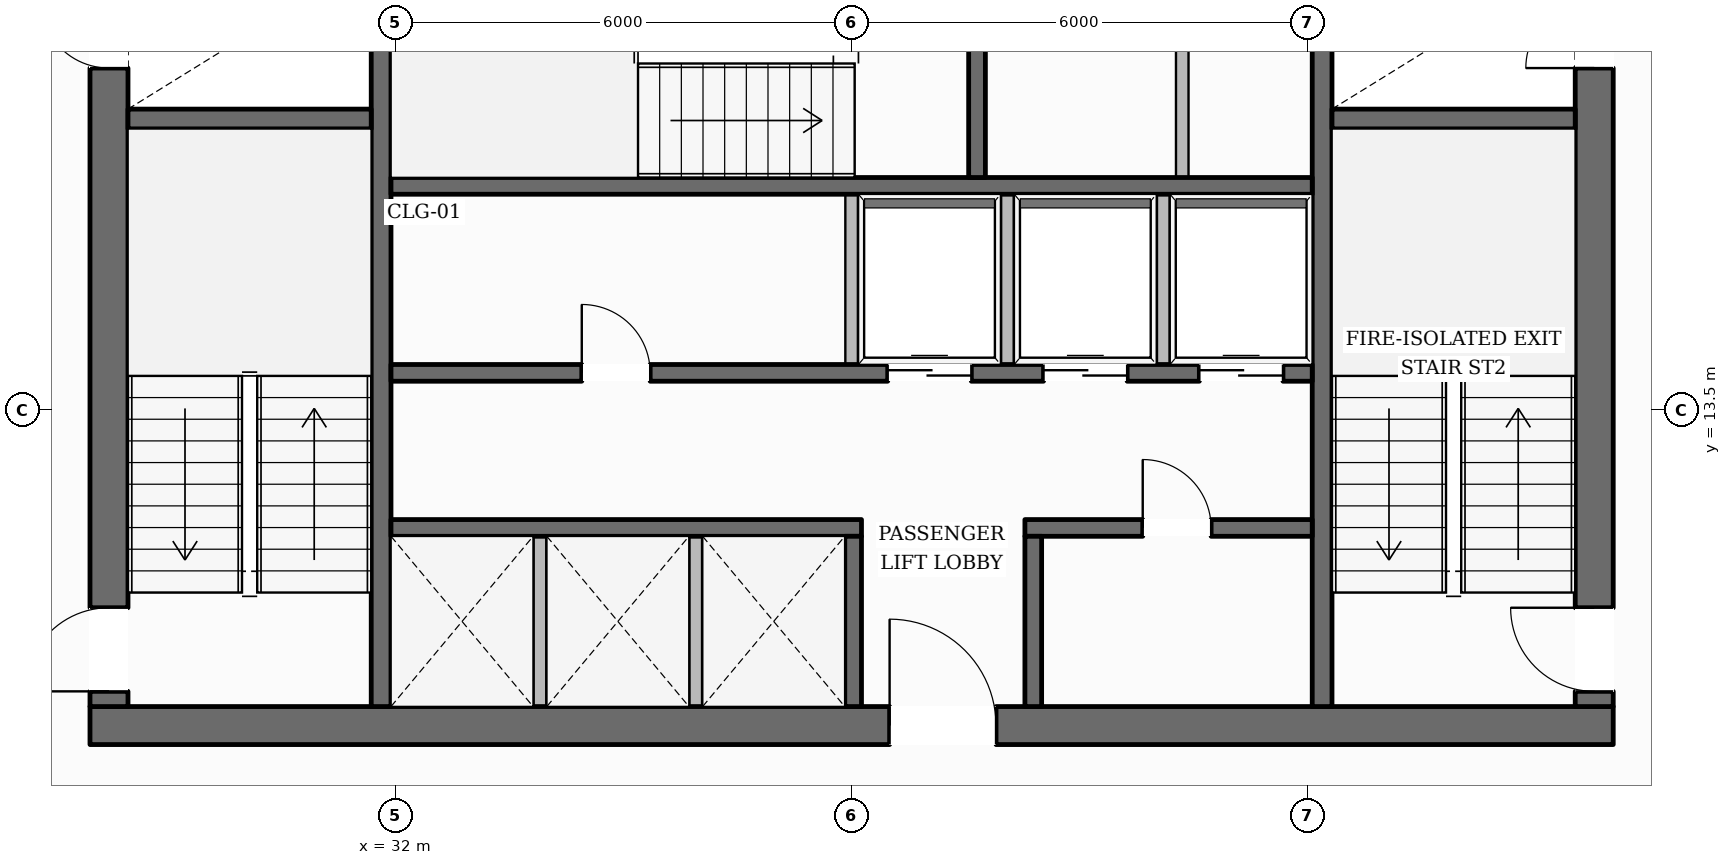
"""IFC4 building model, lengths in metres.
Left out: names, types, materials, properties, quantities, classifications, styles, units other than length and angle.
Written with IfcOpenShell. Run it as: python <this file> out.ifc"""

import sys

from ifc_helpers import new_model, si_unit, direction, frame, frame_2d, origin, place, context, subcontext, project, spatial, rectangle, extrude, element, fill, save


model = new_model("IFC4")
c1 = context("Model", 3, precision=1e-05, world=origin(), true_north=direction((0.0, 1.0)))
c2 = subcontext(c1, "Body", "Model", "MODEL_VIEW")
j1 = project(units=[si_unit("LENGTHUNIT", "METRE"), si_unit("PLANEANGLEUNIT", "RADIAN")], contexts=[c1])
p1 = place(None, origin())
s1 = spatial("IfcSite", under=j1, at=p1, CompositionType="ELEMENT")
p2 = place(p1, origin())
s2 = spatial("IfcBuilding", under=s1, at=p2, CompositionType="ELEMENT")
p3 = place(p2, frame((0.0, 0.0, 135.55)))
s3 = spatial("IfcBuildingStorey", under=s2, at=p3, CompositionType="ELEMENT", Elevation=135.55)
p4 = place(p3, frame((27.98, 9.35, 0.0), z_axis=(0.0, 0.0, 1.0), x_axis=(1.0, 0.0, 0.0)))
e1 = element("IfcWall", 1, at=p4, inside=s3, PredefinedType="SOLIDWALL", context=c2, shape_type="SweptSolid", body=[
    extrude(rectangle(XDim=20.04, YDim=0.5, at=frame_2d((10.02, 0.0))), origin(), (0.0, 0.0, 1.0), 3.6),
])
p5 = place(p4, frame((10.52, 0.0, 0.0)))
e2 = element("IfcOpeningElement", 2, at=p5, cuts=e1, PredefinedType="OPENING", context=c2, shape_type="SweptSolid", body=[
    extrude(rectangle(XDim=1.4, YDim=2.2, at=frame_2d((0.7, 1.1))), frame((0.0, 0.26, 0.0), z_axis=(0.0, -1.0, 0.0), x_axis=(1.0, 0.0, 0.0)), (0.0, 0.0, 1.0), 0.52),
])
p6 = place(p3, frame((28.23, 9.6, 0.0), z_axis=(0.0, 0.0, 1.0), x_axis=(0.0, 1.0, 0.0)))
e3 = element("IfcWall", 3, at=p6, inside=s3, PredefinedType="SOLIDWALL", context=c2, shape_type="SweptSolid", body=[
    extrude(rectangle(XDim=13.0, YDim=0.5, at=frame_2d((6.5, 0.0))), origin(), (0.0, 0.0, 1.0), 3.6),
])
p7 = place(p6, frame((0.2, 0.0, 0.0)))
e4 = element("IfcOpeningElement", 4, at=p7, cuts=e3, PredefinedType="OPENING", context=c2, shape_type="SweptSolid", body=[
    extrude(rectangle(XDim=1.1, YDim=2.15, at=frame_2d((0.55, 1.075))), frame((0.0, 0.26, 0.0), z_axis=(0.0, -1.0, 0.0), x_axis=(1.0, 0.0, 0.0)), (0.0, 0.0, 1.0), 0.52),
])
p8 = place(p6, frame((8.4, 0.0, 0.0)))
e5 = element("IfcOpeningElement", 5, at=p8, cuts=e3, PredefinedType="OPENING", context=c2, shape_type="SweptSolid", body=[
    extrude(rectangle(XDim=0.9, YDim=2.1, at=frame_2d((0.45, 1.05))), frame((0.0, 0.26, 0.0), z_axis=(0.0, -1.0, 0.0), x_axis=(1.0, 0.0, 0.0)), (0.0, 0.0, 1.0), 0.52),
])
p9 = place(p3, frame((47.77, 9.6, 0.0), z_axis=(0.0, 0.0, 1.0), x_axis=(0.0, 1.0, 0.0)))
e6 = element("IfcWall", 6, at=p9, inside=s3, PredefinedType="SOLIDWALL", context=c2, shape_type="SweptSolid", body=[
    extrude(rectangle(XDim=13.0, YDim=0.5, at=frame_2d((6.5, 0.0))), origin(), (0.0, 0.0, 1.0), 3.6),
])
p10 = place(p9, frame((0.2, 0.0, 0.0)))
e7 = element("IfcOpeningElement", 7, at=p10, cuts=e6, PredefinedType="OPENING", context=c2, shape_type="SweptSolid", body=[
    extrude(rectangle(XDim=1.1, YDim=2.15, at=frame_2d((0.55, 1.075))), frame((0.0, 0.26, 0.0), z_axis=(0.0, -1.0, 0.0), x_axis=(1.0, 0.0, 0.0)), (0.0, 0.0, 1.0), 0.52),
])
p11 = place(p9, frame((8.4, 0.0, 0.0)))
e8 = element("IfcOpeningElement", 8, at=p11, cuts=e6, PredefinedType="OPENING", context=c2, shape_type="SweptSolid", body=[
    extrude(rectangle(XDim=0.9, YDim=2.1, at=frame_2d((0.45, 1.05))), frame((0.0, 0.26, 0.0), z_axis=(0.0, -1.0, 0.0), x_axis=(1.0, 0.0, 0.0)), (0.0, 0.0, 1.0), 0.52),
])
p12 = place(p3, frame((31.81, 9.6, 0.0), z_axis=(0.0, 0.0, 1.0), x_axis=(0.0, 1.0, 0.0)))
e9 = element("IfcWall", 9, at=p12, inside=s3, PredefinedType="SHEAR", context=c2, shape_type="SweptSolid", body=[
    extrude(rectangle(XDim=13.0, YDim=0.26, at=frame_2d((6.5, 0.0))), origin(), (0.0, 0.0, 1.0), 3.6),
])
p13 = place(p12, frame((10.925, 0.0, 0.0)))
e10 = element("IfcOpeningElement", 10, at=p13, cuts=e9, PredefinedType="OPENING", context=c2, shape_type="SweptSolid", body=[
    extrude(rectangle(XDim=1.25, YDim=2.25, at=frame_2d((0.625, 1.125))), frame((0.0, 0.14, 0.0), z_axis=(0.0, -1.0, 0.0), x_axis=(1.0, 0.0, 0.0)), (0.0, 0.0, 1.0), 0.28),
])
p14 = place(p3, frame((44.19, 9.6, 0.0), z_axis=(0.0, 0.0, 1.0), x_axis=(0.0, 1.0, 0.0)))
e11 = element("IfcWall", 11, at=p14, inside=s3, PredefinedType="SHEAR", context=c2, shape_type="SweptSolid", body=[
    extrude(rectangle(XDim=13.0, YDim=0.26, at=frame_2d((6.5, 0.0))), origin(), (0.0, 0.0, 1.0), 3.6),
])
p15 = place(p14, frame((10.925, 0.0, 0.0)))
e12 = element("IfcOpeningElement", 12, at=p15, cuts=e11, PredefinedType="OPENING", context=c2, shape_type="SweptSolid", body=[
    extrude(rectangle(XDim=1.25, YDim=2.25, at=frame_2d((0.625, 1.125))), frame((0.0, 0.14, 0.0), z_axis=(0.0, -1.0, 0.0), x_axis=(1.0, 0.0, 0.0)), (0.0, 0.0, 1.0), 0.28),
])
for number, where, z_axis, x_axis in (
    (13, (28.48, 17.33, 0.0), (0.0, 0.0, 1.0), (1.0, 0.0, 0.0)),
    (14, (44.32, 17.33, 0.0), (0.0, 0.0, 1.0), (1.0, 0.0, 0.0)),
):
    element("IfcWall", number, at=place(p3, frame(where, z_axis=z_axis, x_axis=x_axis)), inside=s3, PredefinedType="SHEAR", context=c2, shape_type="SweptSolid", body=[
        extrude(rectangle(XDim=3.2, YDim=0.26, at=frame_2d((1.6, 0.0))), origin(), (0.0, 0.0, 1.0), 3.6),
    ])
p16 = place(p3, frame((31.94, 16.45, 0.0), z_axis=(0.0, 0.0, 1.0), x_axis=(1.0, 0.0, 0.0)))
e15 = element("IfcWall", 15, at=p16, inside=s3, PredefinedType="SOLIDWALL", context=c2, shape_type="SweptSolid", body=[
    extrude(rectangle(XDim=12.12, YDim=0.22, at=frame_2d((6.06, 0.0))), origin(), (0.0, 0.0, 1.0), 3.6),
])
p17 = place(p3, frame((39.65, 16.56, 0.0), z_axis=(0.0, 0.0, 1.0), x_axis=(0.0, 1.0, 0.0)))
e16 = element("IfcWall", 16, at=p17, inside=s3, PredefinedType="SOLIDWALL", context=c2, shape_type="SweptSolid", body=[
    extrude(rectangle(XDim=3.2, YDim=0.22, at=frame_2d((1.6, 0.0))), origin(), (0.0, 0.0, 1.0), 3.6),
])
p18 = place(p3, frame((31.94, 13.99, 0.0), z_axis=(0.0, 0.0, 1.0), x_axis=(1.0, 0.0, 0.0)))
e17 = element("IfcWall", 17, at=p18, inside=s3, PredefinedType="SOLIDWALL", context=c2, shape_type="SweptSolid", body=[
    extrude(rectangle(XDim=12.12, YDim=0.22, at=frame_2d((6.06, 0.0))), origin(), (0.0, 0.0, 1.0), 3.6),
])
p19 = place(p18, frame((2.51, 0.0, 0.0)))
e18 = element("IfcOpeningElement", 18, at=p19, cuts=e17, PredefinedType="OPENING", context=c2, shape_type="SweptSolid", body=[
    extrude(rectangle(XDim=0.9, YDim=2.1, at=frame_2d((0.45, 1.05))), frame((0.0, 0.12, 0.0), z_axis=(0.0, -1.0, 0.0), x_axis=(1.0, 0.0, 0.0)), (0.0, 0.0, 1.0), 0.24),
])
p20 = place(p18, frame((6.535, 0.0, 0.0)))
e19 = element("IfcOpeningElement", 19, at=p20, cuts=e17, PredefinedType="OPENING", context=c2, shape_type="SweptSolid", body=[
    extrude(rectangle(XDim=1.1, YDim=2.2, at=frame_2d((0.55, 1.1))), frame((0.0, 0.12, 0.0), z_axis=(0.0, -1.0, 0.0), x_axis=(1.0, 0.0, 0.0)), (0.0, 0.0, 1.0), 0.24),
])
p21 = place(p18, frame((8.585, 0.0, 0.0)))
e20 = element("IfcOpeningElement", 20, at=p21, cuts=e17, PredefinedType="OPENING", context=c2, shape_type="SweptSolid", body=[
    extrude(rectangle(XDim=1.1, YDim=2.2, at=frame_2d((0.55, 1.1))), frame((0.0, 0.12, 0.0), z_axis=(0.0, -1.0, 0.0), x_axis=(1.0, 0.0, 0.0)), (0.0, 0.0, 1.0), 0.24),
])
p22 = place(p18, frame((10.635, 0.0, 0.0)))
e21 = element("IfcOpeningElement", 21, at=p22, cuts=e17, PredefinedType="OPENING", context=c2, shape_type="SweptSolid", body=[
    extrude(rectangle(XDim=1.1, YDim=2.2, at=frame_2d((0.55, 1.1))), frame((0.0, 0.12, 0.0), z_axis=(0.0, -1.0, 0.0), x_axis=(1.0, 0.0, 0.0)), (0.0, 0.0, 1.0), 0.24),
])
p23 = place(p3, frame((31.94, 11.95, 0.0), z_axis=(0.0, 0.0, 1.0), x_axis=(1.0, 0.0, 0.0)))
e22 = element("IfcWall", 22, at=p23, inside=s3, PredefinedType="SOLIDWALL", context=c2, shape_type="SweptSolid", body=[
    extrude(rectangle(XDim=6.19, YDim=0.22, at=frame_2d((3.095, 0.0))), origin(), (0.0, 0.0, 1.0), 3.6),
])
p24 = place(p3, frame((40.28, 11.95, 0.0), z_axis=(0.0, 0.0, 1.0), x_axis=(1.0, 0.0, 0.0)))
e23 = element("IfcWall", 23, at=p24, inside=s3, PredefinedType="SOLIDWALL", context=c2, shape_type="SweptSolid", body=[
    extrude(rectangle(XDim=3.78, YDim=0.22, at=frame_2d((1.89, 0.0))), origin(), (0.0, 0.0, 1.0), 3.6),
])
p25 = place(p24, frame((1.55, 0.0, 0.0)))
e24 = element("IfcOpeningElement", 24, at=p25, cuts=e23, PredefinedType="OPENING", context=c2, shape_type="SweptSolid", body=[
    extrude(rectangle(XDim=0.9, YDim=2.1, at=frame_2d((0.45, 1.05))), frame((0.0, 0.12, 0.0), z_axis=(0.0, -1.0, 0.0), x_axis=(1.0, 0.0, 0.0)), (0.0, 0.0, 1.0), 0.24),
])
for number, where, z_axis, x_axis in (
    (25, (38.02, 9.6, 0.0), (0.0, 0.0, 1.0), (0.0, 1.0, 0.0)),
    (26, (40.39, 9.6, 0.0), (0.0, 0.0, 1.0), (0.0, 1.0, 0.0)),
):
    element("IfcWall", number, at=place(p3, frame(where, z_axis=z_axis, x_axis=x_axis)), inside=s3, PredefinedType="SOLIDWALL", context=c2, shape_type="SweptSolid", body=[
        extrude(rectangle(XDim=2.24, YDim=0.22, at=frame_2d((1.12, 0.0))), origin(), (0.0, 0.0, 1.0), 3.6),
    ])
p26 = place(p3, frame((13.349, 12.098, 0.0), z_axis=(0.0, 0.0, 1.0), x_axis=(0.506726076083, 0.862107118528, 0.0)))
e27 = element("IfcWall", 27, at=p26, inside=s3, PredefinedType="STANDARD", context=c2, shape_type="SweptSolid", body=[
    extrude(rectangle(XDim=37.522, YDim=0.38, at=frame_2d((18.761, 0.0))), origin(), (0.0, 0.0, 1.0), 3.059),
])
p27 = place(p26, frame((33.226, 0.0, 0.65)))
e28 = element("IfcOpeningElement", 28, at=p27, cuts=e27, PredefinedType="OPENING", context=c2, shape_type="SweptSolid", body=[
    extrude(rectangle(XDim=1.55, YDim=1.75, at=frame_2d((0.775, 0.875))), frame((0.0, 0.2, 0.0), z_axis=(0.0, -1.0, 0.0), x_axis=(1.0, 0.0, 0.0)), (0.0, 0.0, 1.0), 0.4),
])
p28 = place(p26, frame((27.131, 0.0, 0.65)))
e29 = element("IfcOpeningElement", 29, at=p28, cuts=e27, PredefinedType="OPENING", context=c2, shape_type="SweptSolid", body=[
    extrude(rectangle(XDim=1.55, YDim=1.75, at=frame_2d((0.775, 0.875))), frame((0.0, 0.2, 0.0), z_axis=(0.0, -1.0, 0.0), x_axis=(1.0, 0.0, 0.0)), (0.0, 0.0, 1.0), 0.4),
])
p29 = place(p26, frame((21.037, 0.0, 0.65)))
e30 = element("IfcOpeningElement", 30, at=p29, cuts=e27, PredefinedType="OPENING", context=c2, shape_type="SweptSolid", body=[
    extrude(rectangle(XDim=1.55, YDim=1.75, at=frame_2d((0.775, 0.875))), frame((0.0, 0.2, 0.0), z_axis=(0.0, -1.0, 0.0), x_axis=(1.0, 0.0, 0.0)), (0.0, 0.0, 1.0), 0.4),
])
p30 = place(p26, frame((8.848, 0.0, 0.65)))
e31 = element("IfcOpeningElement", 31, at=p30, cuts=e27, PredefinedType="OPENING", context=c2, shape_type="SweptSolid", body=[
    extrude(rectangle(XDim=1.55, YDim=1.75, at=frame_2d((0.775, 0.875))), frame((0.0, 0.2, 0.0), z_axis=(0.0, -1.0, 0.0), x_axis=(1.0, 0.0, 0.0)), (0.0, 0.0, 1.0), 0.4),
])
p31 = place(p26, frame((2.753, 0.0, 0.65)))
e32 = element("IfcOpeningElement", 32, at=p31, cuts=e27, PredefinedType="OPENING", context=c2, shape_type="SweptSolid", body=[
    extrude(rectangle(XDim=1.55, YDim=1.75, at=frame_2d((0.775, 0.875))), frame((0.0, 0.2, 0.0), z_axis=(0.0, -1.0, 0.0), x_axis=(1.0, 0.0, 0.0)), (0.0, 0.0, 1.0), 0.4),
])
p32 = place(p3, frame((43.578, 44.481, 0.0), z_axis=(0.0, 0.0, 1.0), x_axis=(0.504151594759, -0.863615174428, 0.0)))
e33 = element("IfcWall", 33, at=p32, inside=s3, PredefinedType="STANDARD", context=c2, shape_type="SweptSolid", body=[
    extrude(rectangle(XDim=37.328, YDim=0.38, at=frame_2d((18.664, 0.0))), origin(), (0.0, 0.0, 1.0), 3.059),
])
p33 = place(p32, frame((8.932, 0.0, 0.0)))
e34 = element("IfcOpeningElement", 34, at=p33, cuts=e33, PredefinedType="OPENING", context=c2, shape_type="SweptSolid", body=[
    extrude(rectangle(XDim=1.0, YDim=2.2, at=frame_2d((0.5, 1.1))), frame((0.0, 0.2, 0.0), z_axis=(0.0, -1.0, 0.0), x_axis=(1.0, 0.0, 0.0)), (0.0, 0.0, 1.0), 0.4),
])
p34 = place(p32, frame((33.041, 0.0, 0.65)))
e35 = element("IfcOpeningElement", 35, at=p34, cuts=e33, PredefinedType="OPENING", context=c2, shape_type="SweptSolid", body=[
    extrude(rectangle(XDim=1.55, YDim=1.75, at=frame_2d((0.775, 0.875))), frame((0.0, 0.2, 0.0), z_axis=(0.0, -1.0, 0.0), x_axis=(1.0, 0.0, 0.0)), (0.0, 0.0, 1.0), 0.4),
])
p35 = place(p32, frame((26.979, 0.0, 0.65)))
e36 = element("IfcOpeningElement", 36, at=p35, cuts=e33, PredefinedType="OPENING", context=c2, shape_type="SweptSolid", body=[
    extrude(rectangle(XDim=1.55, YDim=1.75, at=frame_2d((0.775, 0.875))), frame((0.0, 0.2, 0.0), z_axis=(0.0, -1.0, 0.0), x_axis=(1.0, 0.0, 0.0)), (0.0, 0.0, 1.0), 0.4),
])
p36 = place(p32, frame((20.917, 0.0, 0.65)))
e37 = element("IfcOpeningElement", 37, at=p36, cuts=e33, PredefinedType="OPENING", context=c2, shape_type="SweptSolid", body=[
    extrude(rectangle(XDim=1.55, YDim=1.75, at=frame_2d((0.775, 0.875))), frame((0.0, 0.2, 0.0), z_axis=(0.0, -1.0, 0.0), x_axis=(1.0, 0.0, 0.0)), (0.0, 0.0, 1.0), 0.4),
])
p37 = place(p32, frame((2.732, 0.0, 0.65)))
e38 = element("IfcOpeningElement", 38, at=p37, cuts=e33, PredefinedType="OPENING", context=c2, shape_type="SweptSolid", body=[
    extrude(rectangle(XDim=1.55, YDim=1.75, at=frame_2d((0.775, 0.875))), frame((0.0, 0.2, 0.0), z_axis=(0.0, -1.0, 0.0), x_axis=(1.0, 0.0, 0.0)), (0.0, 0.0, 1.0), 0.4),
])
for number, where, z_axis, x_axis in (
    (39, (33.9, 9.55, 0.0), (0.0, 0.0, 1.0), (0.0, 1.0, 0.0)),
    (40, (35.95, 9.55, 0.0), (0.0, 0.0, 1.0), (0.0, 1.0, 0.0)),
):
    element("IfcWall", number, at=place(p3, frame(where, z_axis=z_axis, x_axis=x_axis)), inside=s3, PredefinedType="PARTITIONING", context=c2, shape_type="SweptSolid", body=[
        extrude(rectangle(XDim=2.29, YDim=0.165, at=frame_2d((1.145, 0.0))), origin(), (0.0, 0.0, 1.0), 3.6),
    ])
for number, where, z_axis, x_axis in (
    (41, (38.0, 14.1, 0.0), (0.0, 0.0, 1.0), (0.0, 1.0, 0.0)),
    (42, (40.05, 14.1, 0.0), (0.0, 0.0, 1.0), (0.0, 1.0, 0.0)),
    (43, (42.1, 14.1, 0.0), (0.0, 0.0, 1.0), (0.0, 1.0, 0.0)),
):
    element("IfcWall", number, at=place(p3, frame(where, z_axis=z_axis, x_axis=x_axis)), inside=s3, PredefinedType="PARTITIONING", context=c2, shape_type="SweptSolid", body=[
        extrude(rectangle(XDim=2.24, YDim=0.165, at=frame_2d((1.12, 0.0))), origin(), (0.0, 0.0, 1.0), 3.6),
    ])
p38 = place(p3, frame((42.35, 16.56, 0.0), z_axis=(0.0, 0.0, 1.0), x_axis=(0.0, 1.0, 0.0)))
e44 = element("IfcWall", 44, at=p38, inside=s3, PredefinedType="PARTITIONING", context=c2, shape_type="SweptSolid", body=[
    extrude(rectangle(XDim=3.2, YDim=0.165, at=frame_2d((1.6, 0.0))), origin(), (0.0, 0.0, 1.0), 3.6),
])
p39 = place(p7, origin())
e45 = element("IfcDoor", 45, at=p39, inside=s3, OperationType="SINGLE_SWING_LEFT", PredefinedType="DOOR", context=c2, shape_type="SweptSolid", body=[
    extrude(rectangle(XDim=1.1, YDim=2.15, at=frame_2d((0.55, 1.075))), frame((0.0, 0.025, 0.0), z_axis=(0.0, -1.0, 0.0), x_axis=(1.0, 0.0, 0.0)), (0.0, 0.0, 1.0), 0.05),
])
fill(e4, e45)
p40 = place(p10, origin())
e46 = element("IfcDoor", 46, at=p40, inside=s3, OperationType="SINGLE_SWING_RIGHT", PredefinedType="DOOR", context=c2, shape_type="SweptSolid", body=[
    extrude(rectangle(XDim=1.1, YDim=2.15, at=frame_2d((0.55, 1.075))), frame((0.0, 0.025, 0.0), z_axis=(0.0, -1.0, 0.0), x_axis=(1.0, 0.0, 0.0)), (0.0, 0.0, 1.0), 0.05),
])
fill(e7, e46)
p41 = place(p8, origin())
e47 = element("IfcDoor", 47, at=p41, inside=s3, OperationType="SINGLE_SWING_RIGHT", PredefinedType="DOOR", context=c2, shape_type="SweptSolid", body=[
    extrude(rectangle(XDim=0.9, YDim=2.1, at=frame_2d((0.45, 1.05))), frame((0.0, 0.025, 0.0), z_axis=(0.0, -1.0, 0.0), x_axis=(1.0, 0.0, 0.0)), (0.0, 0.0, 1.0), 0.05),
])
fill(e5, e47)
p42 = place(p11, origin())
e48 = element("IfcDoor", 48, at=p42, inside=s3, OperationType="SINGLE_SWING_LEFT", PredefinedType="DOOR", context=c2, shape_type="SweptSolid", body=[
    extrude(rectangle(XDim=0.9, YDim=2.1, at=frame_2d((0.45, 1.05))), frame((0.0, 0.025, 0.0), z_axis=(0.0, -1.0, 0.0), x_axis=(1.0, 0.0, 0.0)), (0.0, 0.0, 1.0), 0.05),
])
fill(e8, e48)
p43 = place(p5, origin())
e49 = element("IfcDoor", 49, at=p43, inside=s3, OperationType="SINGLE_SWING_LEFT", PredefinedType="DOOR", context=c2, shape_type="SweptSolid", body=[
    extrude(rectangle(XDim=1.4, YDim=2.2, at=frame_2d((0.7, 1.1))), frame((0.0, 0.025, 0.0), z_axis=(0.0, -1.0, 0.0), x_axis=(1.0, 0.0, 0.0)), (0.0, 0.0, 1.0), 0.05),
])
fill(e2, e49)
p44 = place(p19, origin())
e50 = element("IfcDoor", 50, at=p44, inside=s3, OperationType="SINGLE_SWING_LEFT", PredefinedType="DOOR", context=c2, shape_type="SweptSolid", body=[
    extrude(rectangle(XDim=0.9, YDim=2.1, at=frame_2d((0.45, 1.05))), frame((0.0, 0.025, 0.0), z_axis=(0.0, -1.0, 0.0), x_axis=(1.0, 0.0, 0.0)), (0.0, 0.0, 1.0), 0.05),
])
fill(e18, e50)
p45 = place(p20, origin())
e51 = element("IfcDoor", 51, at=p45, inside=s3, OperationType="DOUBLE_DOOR_SLIDING", PredefinedType="DOOR", context=c2, shape_type="SweptSolid", body=[
    extrude(rectangle(XDim=1.1, YDim=2.2, at=frame_2d((0.55, 1.1))), frame((0.0, 0.025, 0.0), z_axis=(0.0, -1.0, 0.0), x_axis=(1.0, 0.0, 0.0)), (0.0, 0.0, 1.0), 0.05),
])
fill(e19, e51)
p46 = place(p21, origin())
e52 = element("IfcDoor", 52, at=p46, inside=s3, OperationType="DOUBLE_DOOR_SLIDING", PredefinedType="DOOR", context=c2, shape_type="SweptSolid", body=[
    extrude(rectangle(XDim=1.1, YDim=2.2, at=frame_2d((0.55, 1.1))), frame((0.0, 0.025, 0.0), z_axis=(0.0, -1.0, 0.0), x_axis=(1.0, 0.0, 0.0)), (0.0, 0.0, 1.0), 0.05),
])
fill(e20, e52)
p47 = place(p22, origin())
e53 = element("IfcDoor", 53, at=p47, inside=s3, OperationType="DOUBLE_DOOR_SLIDING", PredefinedType="DOOR", context=c2, shape_type="SweptSolid", body=[
    extrude(rectangle(XDim=1.1, YDim=2.2, at=frame_2d((0.55, 1.1))), frame((0.0, 0.025, 0.0), z_axis=(0.0, -1.0, 0.0), x_axis=(1.0, 0.0, 0.0)), (0.0, 0.0, 1.0), 0.05),
])
fill(e21, e53)
p48 = place(p25, origin())
e54 = element("IfcDoor", 54, at=p48, inside=s3, OperationType="SINGLE_SWING_LEFT", PredefinedType="DOOR", context=c2, shape_type="SweptSolid", body=[
    extrude(rectangle(XDim=0.9, YDim=2.1, at=frame_2d((0.45, 1.05))), frame((0.0, 0.025, 0.0), z_axis=(0.0, -1.0, 0.0), x_axis=(1.0, 0.0, 0.0)), (0.0, 0.0, 1.0), 0.05),
])
fill(e24, e54)
save(model, sys.argv[1])
